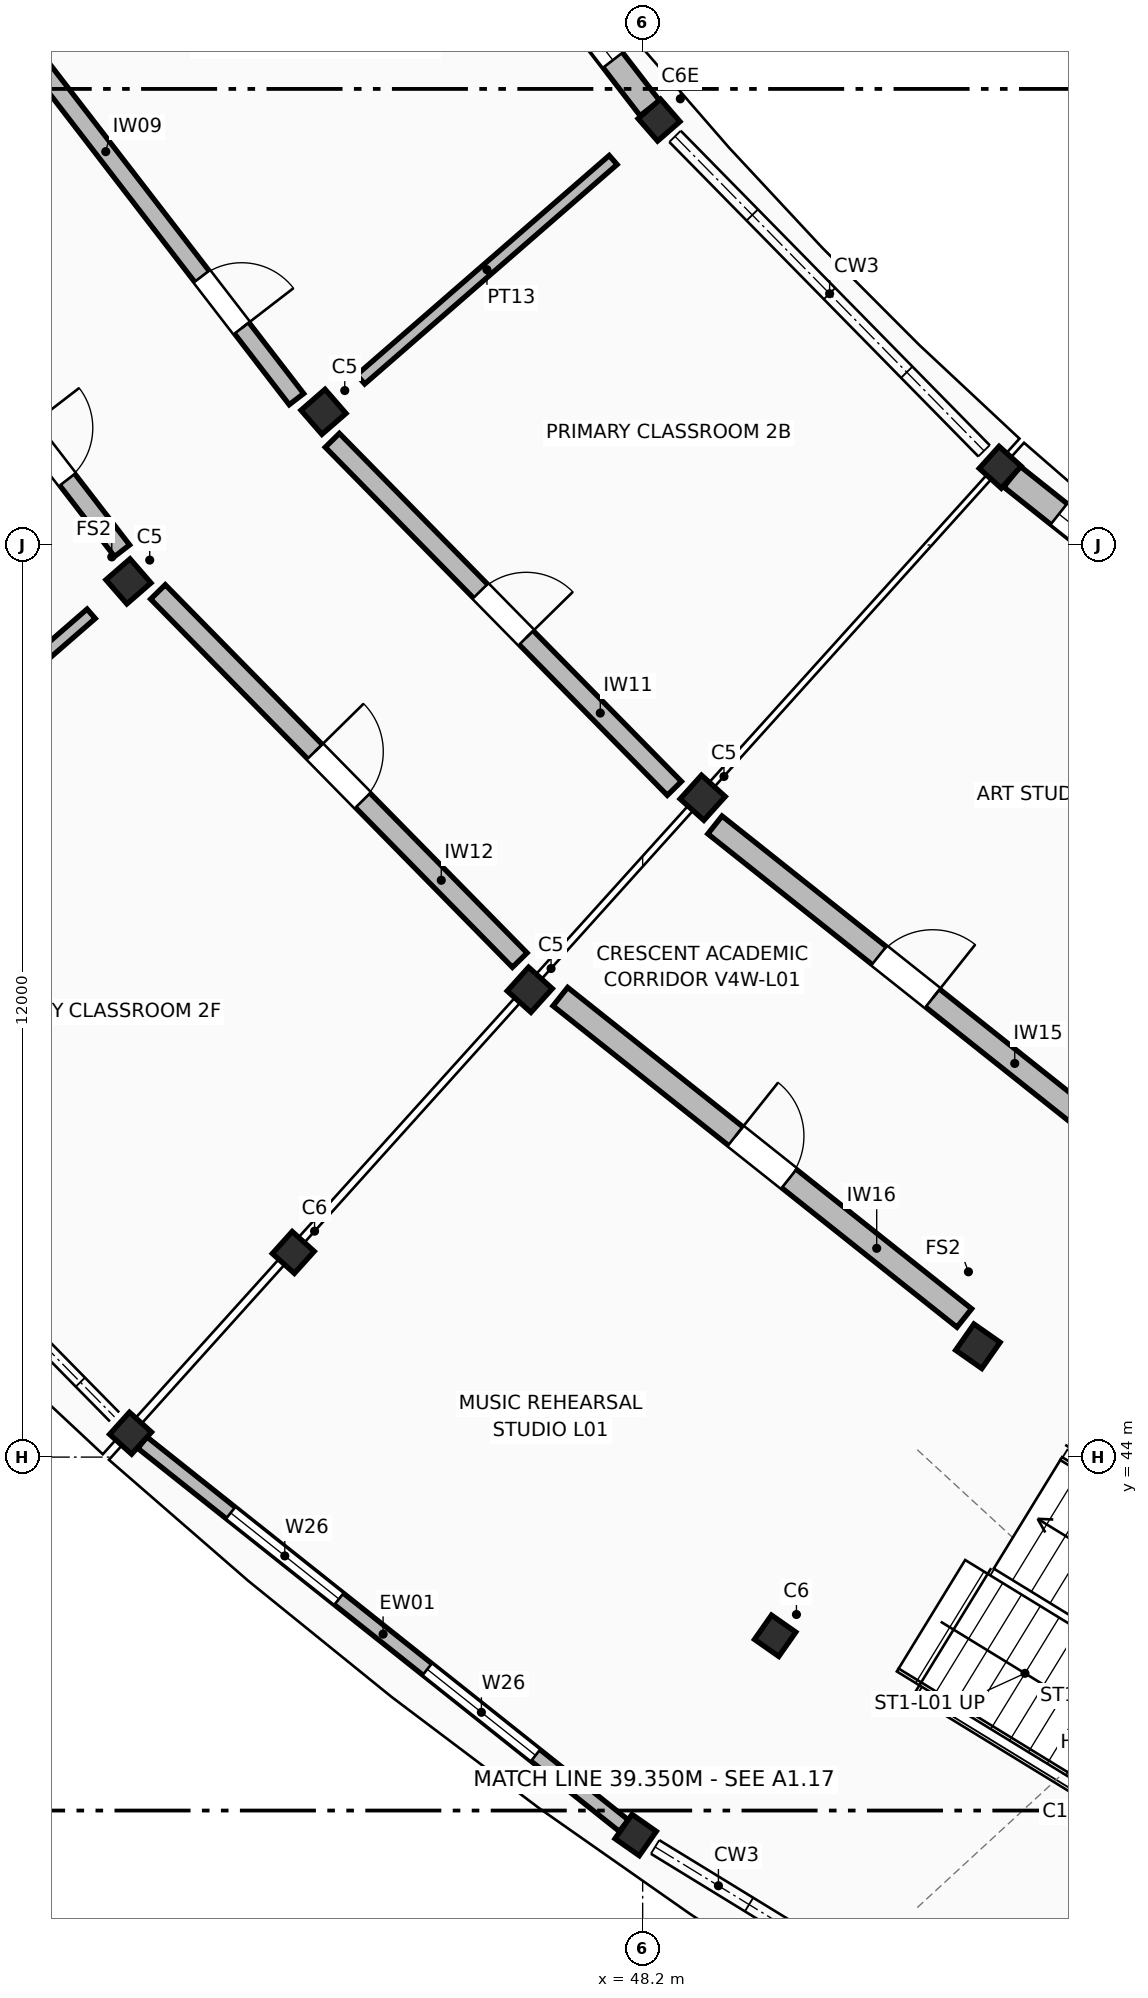
"""IFC4 building model, lengths in metres.
Left out: names, types, materials, properties, quantities, classifications, styles, units other than length and angle.
Written with IfcOpenShell. Run it as: python <this file> out.ifc"""

import sys

from ifc_helpers import new_model, si_unit, direction, frame, frame_2d, origin, origin_2d, place, context, subcontext, project, spatial, rectangle, extrude, element, fill, save


model = new_model("IFC4")
c1 = context("Model", 3, precision=1e-05, world=origin(), true_north=direction((0.0, 1.0)))
c2 = subcontext(c1, "Body", "Model", "MODEL_VIEW")
j1 = project(units=[si_unit("LENGTHUNIT", "METRE"), si_unit("PLANEANGLEUNIT", "RADIAN")], contexts=[c1])
p1 = place(None, origin())
s1 = spatial("IfcSite", under=j1, at=p1, CompositionType="ELEMENT")
p2 = place(p1, origin())
s2 = spatial("IfcBuilding", under=s1, at=p2, CompositionType="ELEMENT")
p3 = place(p2, frame((0.0, 0.0, 4.42)))
s3 = spatial("IfcBuildingStorey", under=s2, at=p3, CompositionType="ELEMENT", Elevation=4.42)
p4 = place(p3, frame((48.416, 61.59, 0.0), z_axis=(0.0, 0.0, 1.0), x_axis=(-0.754709580223, -0.656059028991, 0.0)))
e1 = element("IfcColumn", 1, at=p4, inside=s3, PredefinedType="COLUMN", context=c2, shape_type="SweptSolid", body=[
    extrude(rectangle(XDim=0.39, YDim=0.39, at=origin_2d()), origin(), (0.0, 0.0, 1.0), 3.74),
])
for number, where, z_axis, x_axis in (
    (2, (44.0, 57.752, 0.0), (0.0, 0.0, 1.0), (-0.755, -0.656, 0.0)),
    (3, (41.434, 55.521, 0.0), (0.0, 0.0, 1.0), (-0.755, -0.656, 0.0)),
):
    element("IfcColumn", number, at=place(p3, frame(where, z_axis=z_axis, x_axis=x_axis)), inside=s3, PredefinedType="COLUMN", context=c2, shape_type="SweptSolid", body=[
        extrude(rectangle(XDim=0.42, YDim=0.42, at=origin_2d()), origin(), (0.0, 0.0, 1.0), 3.74),
    ])
p5 = place(p3, frame((52.904, 57.022, 0.0), z_axis=(0.0, 0.0, 1.0), x_axis=(-0.669130606359, -0.743144825477, 0.0)))
e4 = element("IfcColumn", 4, at=p5, inside=s3, PredefinedType="COLUMN", context=c2, shape_type="SweptSolid", body=[
    extrude(rectangle(XDim=0.39, YDim=0.39, at=origin_2d()), origin(), (0.0, 0.0, 1.0), 3.74),
])
for number, where, z_axis, x_axis in (
    (5, (48.99, 52.675, 0.0), (0.0, 0.0, 1.0), (-0.669, -0.743, 0.0)),
    (6, (46.715, 50.148, 0.0), (0.0, 0.0, 1.0), (-0.669, -0.743, 0.0)),
):
    element("IfcColumn", number, at=place(p3, frame(where, z_axis=z_axis, x_axis=x_axis)), inside=s3, PredefinedType="COLUMN", context=c2, shape_type="SweptSolid", body=[
        extrude(rectangle(XDim=0.42, YDim=0.42, at=origin_2d()), origin(), (0.0, 0.0, 1.0), 3.74),
    ])
for number, where, z_axis, x_axis in (
    (7, (43.603, 46.692, 0.0), (0.0, 0.0, 1.0), (-0.669, -0.743, 0.0)),
    (8, (41.462, 44.314, 0.0), (0.0, 0.0, 1.0), (-0.669, -0.743, 0.0)),
):
    element("IfcColumn", number, at=place(p3, frame(where, z_axis=z_axis, x_axis=x_axis)), inside=s3, PredefinedType="COLUMN", context=c2, shape_type="SweptSolid", body=[
        extrude(rectangle(XDim=0.39, YDim=0.39, at=origin_2d()), origin(), (0.0, 0.0, 1.0), 3.74),
    ])
p6 = place(p3, frame((52.61, 45.458, 0.0), z_axis=(0.0, 0.0, 1.0), x_axis=(-0.573576436351, -0.819152044289, 0.0)))
e9 = element("IfcColumn", 9, at=p6, inside=s3, PredefinedType="COLUMN", context=c2, shape_type="SweptSolid", body=[
    extrude(rectangle(XDim=0.42, YDim=0.42, at=origin_2d()), origin(), (0.0, 0.0, 1.0), 3.74),
])
for number, where, z_axis, x_axis in (
    (10, (49.943, 41.649, 0.0), (0.0, 0.0, 1.0), (-0.574, -0.819, 0.0)),
    (11, (48.108, 39.028, 0.0), (0.0, 0.0, 1.0), (-0.574, -0.819, 0.0)),
):
    element("IfcColumn", number, at=place(p3, frame(where, z_axis=z_axis, x_axis=x_axis)), inside=s3, PredefinedType="COLUMN", context=c2, shape_type="SweptSolid", body=[
        extrude(rectangle(XDim=0.39, YDim=0.39, at=origin_2d()), origin(), (0.0, 0.0, 1.0), 3.74),
    ])
p7 = place(p3, frame((44.758, 66.335, 0.0), z_axis=(0.0, 0.0, 1.0), x_axis=(0.610413133261, -0.792083206957, 0.0)))
e12 = element("IfcWall", 12, at=p7, inside=s3, PredefinedType="STANDARD", context=c2, shape_type="SweptSolid", body=[
    extrude(rectangle(XDim=5.793, YDim=0.324, at=frame_2d((2.897, 0.0))), origin(), (0.0, 0.0, 1.0), 2.78),
])
p8 = place(p7, frame((0.798, 0.0, 0.95)))
e13 = element("IfcOpeningElement", 13, at=p8, cuts=e12, PredefinedType="OPENING", context=c2, shape_type="SweptSolid", body=[
    extrude(rectangle(XDim=1.7, YDim=1.45, at=frame_2d((0.85, 0.725))), frame((0.0, 0.172, 0.0), z_axis=(0.0, -1.0, 0.0), x_axis=(1.0, 0.0, 0.0)), (0.0, 0.0, 1.0), 0.344),
])
p9 = place(p7, frame((3.296, 0.0, 0.95)))
e14 = element("IfcOpeningElement", 14, at=p9, cuts=e12, PredefinedType="OPENING", context=c2, shape_type="SweptSolid", body=[
    extrude(rectangle(XDim=1.7, YDim=1.45, at=frame_2d((0.85, 0.725))), frame((0.0, 0.172, 0.0), z_axis=(0.0, -1.0, 0.0), x_axis=(1.0, 0.0, 0.0)), (0.0, 0.0, 1.0), 0.344),
])
p10 = place(p3, frame((53.059, 56.899, 0.0), z_axis=(0.0, 0.0, 1.0), x_axis=(0.78261410235, -0.622507162049, 0.0)))
e15 = element("IfcWall", 15, at=p10, inside=s3, PredefinedType="STANDARD", context=c2, shape_type="SweptSolid", body=[
    extrude(rectangle(XDim=6.008, YDim=0.348, at=frame_2d((3.004, 0.0))), origin(), (0.0, 0.0, 1.0), 2.78),
])
p11 = place(p10, frame((0.789, 0.0, 0.95)))
e16 = element("IfcOpeningElement", 16, at=p11, cuts=e15, PredefinedType="OPENING", context=c2, shape_type="SweptSolid", body=[
    extrude(rectangle(XDim=1.82, YDim=1.15, at=frame_2d((0.91, 0.575))), frame((0.0, 0.184, 0.0), z_axis=(0.0, -1.0, 0.0), x_axis=(1.0, 0.0, 0.0)), (0.0, 0.0, 1.0), 0.368),
])
p12 = place(p10, frame((3.399, 0.0, 0.95)))
e17 = element("IfcOpeningElement", 17, at=p12, cuts=e15, PredefinedType="OPENING", context=c2, shape_type="SweptSolid", body=[
    extrude(rectangle(XDim=1.82, YDim=1.15, at=frame_2d((0.91, 0.575))), frame((0.0, 0.184, 0.0), z_axis=(0.0, -1.0, 0.0), x_axis=(1.0, 0.0, 0.0)), (0.0, 0.0, 1.0), 0.368),
])
p13 = place(p3, frame((41.617, 44.191, 0.0), z_axis=(0.0, 0.0, 1.0), x_axis=(0.782610403329, -0.62251181242, 0.0)))
e18 = element("IfcWall", 18, at=p13, inside=s3, PredefinedType="STANDARD", context=c2, shape_type="SweptSolid", body=[
    extrude(rectangle(XDim=8.096, YDim=0.192, at=frame_2d((4.048, 0.0))), origin(), (0.0, 0.0, 1.0), 2.78),
])
p14 = place(p13, frame((1.485, 0.0, 0.95)))
e19 = element("IfcOpeningElement", 19, at=p14, cuts=e18, PredefinedType="OPENING", context=c2, shape_type="SweptSolid", body=[
    extrude(rectangle(XDim=1.82, YDim=1.3, at=frame_2d((0.91, 0.65))), frame((0.0, 0.106, 0.0), z_axis=(0.0, -1.0, 0.0), x_axis=(1.0, 0.0, 0.0)), (0.0, 0.0, 1.0), 0.212),
])
p15 = place(p13, frame((4.791, 0.0, 0.95)))
e20 = element("IfcOpeningElement", 20, at=p15, cuts=e18, PredefinedType="OPENING", context=c2, shape_type="SweptSolid", body=[
    extrude(rectangle(XDim=1.82, YDim=1.3, at=frame_2d((0.91, 0.65))), frame((0.0, 0.106, 0.0), z_axis=(0.0, -1.0, 0.0), x_axis=(1.0, 0.0, 0.0)), (0.0, 0.0, 1.0), 0.212),
])
p16 = place(p3, frame((39.872, 62.815, 0.0), z_axis=(0.0, 0.0, 1.0), x_axis=(0.610376740954, -0.79211125109, 0.0)))
e21 = element("IfcWall", 21, at=p16, inside=s3, PredefinedType="STANDARD", context=c2, shape_type="SweptSolid", body=[
    extrude(rectangle(XDim=6.181, YDim=0.24, at=frame_2d((3.09, 0.0))), origin(), (0.0, 0.0, 1.0), 2.75),
])
p17 = place(p16, frame((4.141, 0.0, 0.0)))
e22 = element("IfcOpeningElement", 22, at=p17, cuts=e21, PredefinedType="OPENING", context=c2, shape_type="SweptSolid", body=[
    extrude(rectangle(XDim=0.86, YDim=2.12, at=frame_2d((0.43, 1.06))), frame((0.0, 0.13, 0.0), z_axis=(0.0, -1.0, 0.0), x_axis=(1.0, 0.0, 0.0)), (0.0, 0.0, 1.0), 0.26),
])
p18 = place(p3, frame((37.359, 61.104, 0.0), z_axis=(0.0, 0.0, 1.0), x_axis=(0.610378079511, -0.792110219637, 0.0)))
e23 = element("IfcWall", 23, at=p18, inside=s3, PredefinedType="STANDARD", context=c2, shape_type="SweptSolid", body=[
    extrude(rectangle(XDim=6.54, YDim=0.25, at=frame_2d((3.27, 0.0))), origin(), (0.0, 0.0, 1.0), 2.75),
])
p19 = place(p18, frame((4.5, 0.0, 0.0)))
e24 = element("IfcOpeningElement", 24, at=p19, cuts=e23, PredefinedType="OPENING", context=c2, shape_type="SweptSolid", body=[
    extrude(rectangle(XDim=0.86, YDim=2.18, at=frame_2d((0.43, 1.09))), frame((0.0, 0.135, 0.0), z_axis=(0.0, -1.0, 0.0), x_axis=(1.0, 0.0, 0.0)), (0.0, 0.0, 1.0), 0.27),
])
p20 = place(p3, frame((44.117, 57.377, 0.0), z_axis=(0.0, 0.0, 1.0), x_axis=(0.700900509406, -0.713259052459, 0.0)))
e25 = element("IfcWall", 25, at=p20, inside=s3, PredefinedType="STANDARD", context=c2, shape_type="SweptSolid", body=[
    extrude(rectangle(XDim=6.42, YDim=0.26, at=frame_2d((3.21, 0.0))), origin(), (0.0, 0.0, 1.0), 2.75),
])
p21 = place(p20, frame((2.78, 0.0, 0.0)))
e26 = element("IfcOpeningElement", 26, at=p21, cuts=e25, PredefinedType="OPENING", context=c2, shape_type="SweptSolid", body=[
    extrude(rectangle(XDim=0.86, YDim=2.24, at=frame_2d((0.43, 1.12))), frame((0.0, 0.14, 0.0), z_axis=(0.0, -1.0, 0.0), x_axis=(1.0, 0.0, 0.0)), (0.0, 0.0, 1.0), 0.28),
])
p22 = place(p3, frame((41.823, 55.383, 0.0), z_axis=(0.0, 0.0, 1.0), x_axis=(0.700914816473, -0.713244993006, 0.0)))
e27 = element("IfcWall", 27, at=p22, inside=s3, PredefinedType="STANDARD", context=c2, shape_type="SweptSolid", body=[
    extrude(rectangle(XDim=6.792, YDim=0.27, at=frame_2d((3.396, 0.0))), origin(), (0.0, 0.0, 1.0), 2.75),
])
p23 = place(p22, frame((2.946, 0.0, 0.0)))
e28 = element("IfcOpeningElement", 28, at=p23, cuts=e27, PredefinedType="OPENING", context=c2, shape_type="SweptSolid", body=[
    extrude(rectangle(XDim=0.9, YDim=2.06, at=frame_2d((0.45, 1.03))), frame((0.0, 0.145, 0.0), z_axis=(0.0, -1.0, 0.0), x_axis=(1.0, 0.0, 0.0)), (0.0, 0.0, 1.0), 0.29),
])
p24 = place(p3, frame((47.812, 61.065, 0.0), z_axis=(0.0, 0.0, 1.0), x_axis=(-0.75471062989, -0.656057821484, 0.0)))
e29 = element("IfcWall", 29, at=p24, inside=s3, PredefinedType="PARTITIONING", context=c2, shape_type="SweptSolid", body=[
    extrude(rectangle(XDim=4.4, YDim=0.158, at=frame_2d((2.2, 0.0))), origin(), (0.0, 0.0, 1.0), 2.75),
])
p25 = place(p3, frame((40.944, 55.095, 0.0), z_axis=(0.0, 0.0, 1.0), x_axis=(-0.754721612631, -0.656045187032, 0.0)))
e30 = element("IfcWall", 30, at=p25, inside=s3, PredefinedType="PARTITIONING", context=c2, shape_type="SweptSolid", body=[
    extrude(rectangle(XDim=6.7, YDim=0.164, at=frame_2d((3.35, 0.0))), origin(), (0.0, 0.0, 1.0), 2.75),
])
p26 = place(p3, frame((49.151, 52.317, 0.0), z_axis=(0.0, 0.0, 1.0), x_axis=(0.782605685559, -0.622517743467, 0.0)))
e31 = element("IfcWall", 31, at=p26, inside=s3, PredefinedType="STANDARD", context=c2, shape_type="SweptSolid", body=[
    extrude(rectangle(XDim=6.42, YDim=0.3, at=frame_2d((3.21, 0.0))), origin(), (0.0, 0.0, 1.0), 2.75),
])
p27 = place(p26, frame((2.76, 0.0, 0.0)))
e32 = element("IfcOpeningElement", 32, at=p27, cuts=e31, PredefinedType="OPENING", context=c2, shape_type="SweptSolid", body=[
    extrude(rectangle(XDim=0.9, YDim=2.12, at=frame_2d((0.45, 1.06))), frame((0.0, 0.16, 0.0), z_axis=(0.0, -1.0, 0.0), x_axis=(1.0, 0.0, 0.0)), (0.0, 0.0, 1.0), 0.32),
])
p28 = place(p3, frame((47.117, 50.058, 0.0), z_axis=(0.0, 0.0, 1.0), x_axis=(0.782615780998, -0.622505051653, 0.0)))
e33 = element("IfcWall", 33, at=p28, inside=s3, PredefinedType="STANDARD", context=c2, shape_type="SweptSolid", body=[
    extrude(rectangle(XDim=6.792, YDim=0.31, at=frame_2d((3.396, 0.0))), origin(), (0.0, 0.0, 1.0), 2.75),
])
p29 = place(p28, frame((2.946, 0.0, 0.0)))
e34 = element("IfcOpeningElement", 34, at=p29, cuts=e33, PredefinedType="OPENING", context=c2, shape_type="SweptSolid", body=[
    extrude(rectangle(XDim=0.9, YDim=2.18, at=frame_2d((0.45, 1.09))), frame((0.0, 0.165, 0.0), z_axis=(0.0, -1.0, 0.0), x_axis=(1.0, 0.0, 0.0)), (0.0, 0.0, 1.0), 0.33),
])
p30 = place(p9, origin())
e35 = element("IfcWindow", 35, at=p30, inside=s3, PartitioningType="SINGLE_PANEL", PredefinedType="WINDOW", context=c2, shape_type="SweptSolid", body=[
    extrude(rectangle(XDim=1.7, YDim=1.45, at=frame_2d((0.85, 0.725))), frame((0.0, 0.03, 0.0), z_axis=(0.0, -1.0, 0.0), x_axis=(1.0, 0.0, 0.0)), (0.0, 0.0, 1.0), 0.06),
])
fill(e14, e35)
p31 = place(p11, origin())
e36 = element("IfcWindow", 36, at=p31, inside=s3, PartitioningType="SINGLE_PANEL", PredefinedType="WINDOW", context=c2, shape_type="SweptSolid", body=[
    extrude(rectangle(XDim=1.82, YDim=1.15, at=frame_2d((0.91, 0.575))), frame((0.0, 0.03, 0.0), z_axis=(0.0, -1.0, 0.0), x_axis=(1.0, 0.0, 0.0)), (0.0, 0.0, 1.0), 0.06),
])
fill(e16, e36)
p32 = place(p14, origin())
e37 = element("IfcWindow", 37, at=p32, inside=s3, PartitioningType="SINGLE_PANEL", PredefinedType="WINDOW", context=c2, shape_type="SweptSolid", body=[
    extrude(rectangle(XDim=1.82, YDim=1.3, at=frame_2d((0.91, 0.65))), frame((0.0, 0.03, 0.0), z_axis=(0.0, -1.0, 0.0), x_axis=(1.0, 0.0, 0.0)), (0.0, 0.0, 1.0), 0.06),
])
fill(e19, e37)
p33 = place(p15, origin())
e38 = element("IfcWindow", 38, at=p33, inside=s3, PartitioningType="SINGLE_PANEL", PredefinedType="WINDOW", context=c2, shape_type="SweptSolid", body=[
    extrude(rectangle(XDim=1.82, YDim=1.3, at=frame_2d((0.91, 0.65))), frame((0.0, 0.03, 0.0), z_axis=(0.0, -1.0, 0.0), x_axis=(1.0, 0.0, 0.0)), (0.0, 0.0, 1.0), 0.06),
])
fill(e20, e38)
p34 = place(p17, frame((0.86, 0.0, 0.0), z_axis=(0.0, 0.0, 1.0), x_axis=(-1.0, 0.0, 0.0)))
e39 = element("IfcDoor", 39, at=p34, inside=s3, OperationType="SINGLE_SWING_RIGHT", PredefinedType="DOOR", context=c2, shape_type="SweptSolid", body=[
    extrude(rectangle(XDim=0.86, YDim=2.12, at=frame_2d((0.43, 1.06))), frame((0.0, 0.025, 0.0), z_axis=(0.0, -1.0, 0.0), x_axis=(1.0, 0.0, 0.0)), (0.0, 0.0, 1.0), 0.05),
])
fill(e22, e39)
p35 = place(p19, origin())
e40 = element("IfcDoor", 40, at=p35, inside=s3, OperationType="SINGLE_SWING_LEFT", PredefinedType="DOOR", context=c2, shape_type="SweptSolid", body=[
    extrude(rectangle(XDim=0.86, YDim=2.18, at=frame_2d((0.43, 1.09))), frame((0.0, 0.025, 0.0), z_axis=(0.0, -1.0, 0.0), x_axis=(1.0, 0.0, 0.0)), (0.0, 0.0, 1.0), 0.05),
])
fill(e24, e40)
p36 = place(p21, frame((0.86, 0.0, 0.0), z_axis=(0.0, 0.0, 1.0), x_axis=(-1.0, 0.0, 0.0)))
e41 = element("IfcDoor", 41, at=p36, inside=s3, OperationType="SINGLE_SWING_RIGHT", PredefinedType="DOOR", context=c2, shape_type="SweptSolid", body=[
    extrude(rectangle(XDim=0.86, YDim=2.24, at=frame_2d((0.43, 1.12))), frame((0.0, 0.025, 0.0), z_axis=(0.0, -1.0, 0.0), x_axis=(1.0, 0.0, 0.0)), (0.0, 0.0, 1.0), 0.05),
])
fill(e26, e41)
p37 = place(p23, origin())
e42 = element("IfcDoor", 42, at=p37, inside=s3, OperationType="SINGLE_SWING_LEFT", PredefinedType="DOOR", context=c2, shape_type="SweptSolid", body=[
    extrude(rectangle(XDim=0.9, YDim=2.06, at=frame_2d((0.45, 1.03))), frame((0.0, 0.025, 0.0), z_axis=(0.0, -1.0, 0.0), x_axis=(1.0, 0.0, 0.0)), (0.0, 0.0, 1.0), 0.05),
])
fill(e28, e42)
p38 = place(p27, frame((0.9, 0.0, 0.0), z_axis=(0.0, 0.0, 1.0), x_axis=(-1.0, 0.0, 0.0)))
e43 = element("IfcDoor", 43, at=p38, inside=s3, OperationType="SINGLE_SWING_RIGHT", PredefinedType="DOOR", context=c2, shape_type="SweptSolid", body=[
    extrude(rectangle(XDim=0.9, YDim=2.12, at=frame_2d((0.45, 1.06))), frame((0.0, 0.025, 0.0), z_axis=(0.0, -1.0, 0.0), x_axis=(1.0, 0.0, 0.0)), (0.0, 0.0, 1.0), 0.05),
])
fill(e32, e43)
p39 = place(p29, origin())
e44 = element("IfcDoor", 44, at=p39, inside=s3, OperationType="SINGLE_SWING_LEFT", PredefinedType="DOOR", context=c2, shape_type="SweptSolid", body=[
    extrude(rectangle(XDim=0.9, YDim=2.18, at=frame_2d((0.45, 1.09))), frame((0.0, 0.025, 0.0), z_axis=(0.0, -1.0, 0.0), x_axis=(1.0, 0.0, 0.0)), (0.0, 0.0, 1.0), 0.05),
])
fill(e34, e44)
save(model, sys.argv[1])
